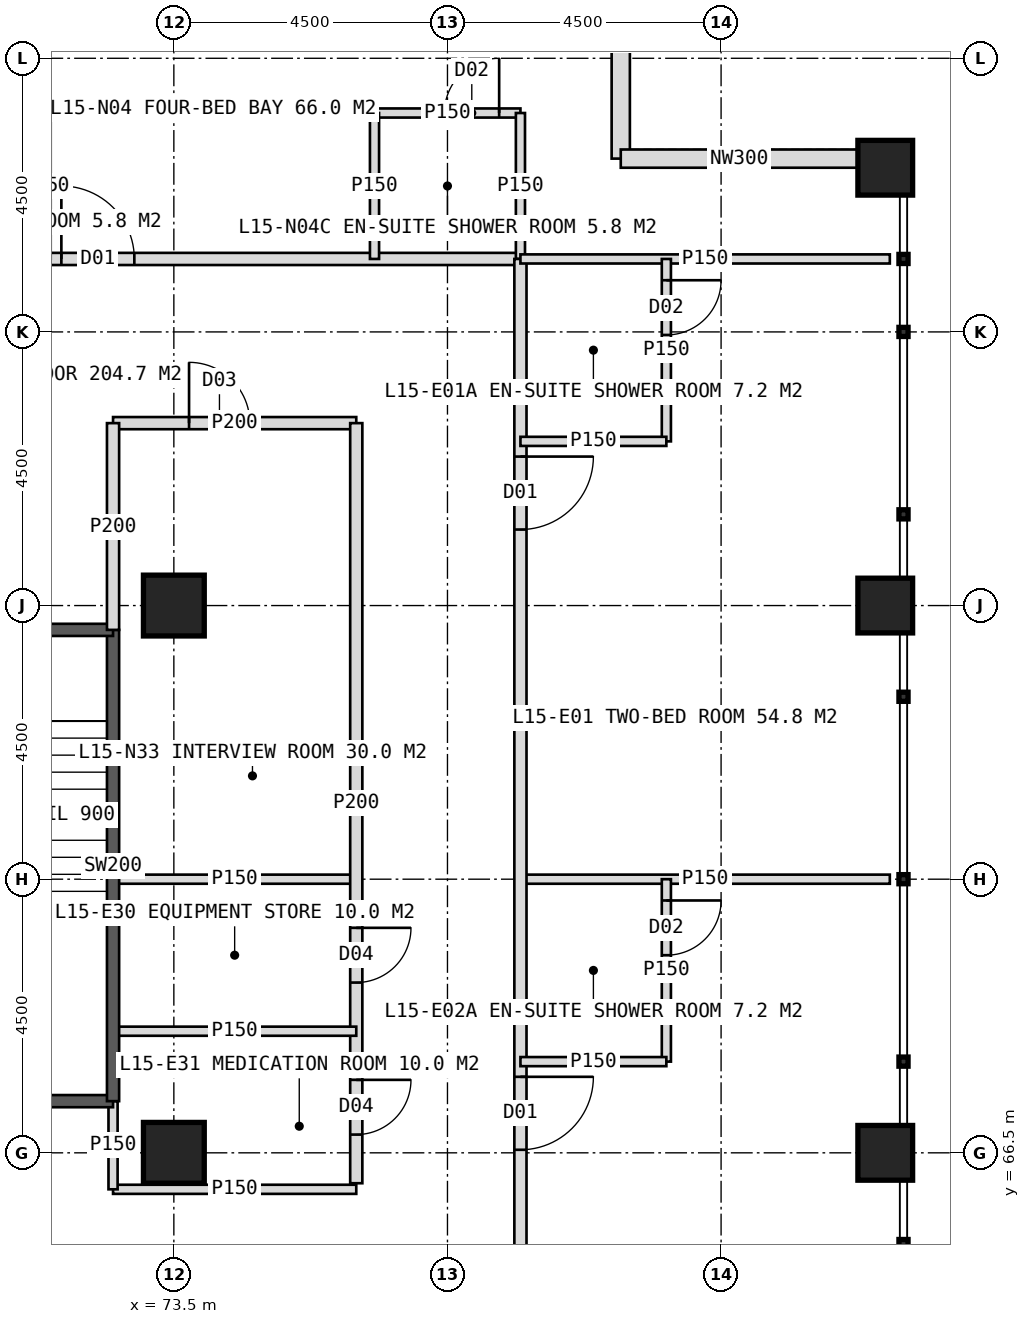
"""IFC4 building model, lengths in metres.
Left out: names, types, materials, properties, quantities, classifications, styles, units other than length and angle.
Written with IfcOpenShell. Run it as: python <this file> out.ifc"""

import sys

from ifc_helpers import new_model, si_unit, direction, frame, frame_2d, origin, origin_2d, place, context, subcontext, project, spatial, rectangle, hollow_rectangle, extrude, element, fill, save


model = new_model("IFC4")
c1 = context("Model", 3, precision=1e-05, world=origin(), true_north=direction((0.0, 1.0)))
c2 = subcontext(c1, "Body", "Model", "MODEL_VIEW")
j1 = project(units=[si_unit("LENGTHUNIT", "METRE"), si_unit("PLANEANGLEUNIT", "RADIAN")], contexts=[c1])
p1 = place(None, origin())
s1 = spatial("IfcSite", under=j1, at=p1, CompositionType="ELEMENT")
p2 = place(p1, origin())
s2 = spatial("IfcBuilding", under=s1, at=p2, CompositionType="ELEMENT")
p3 = place(p2, frame((0.0, 0.0, 67.0)))
s3 = spatial("IfcBuildingStorey", under=s2, at=p3, CompositionType="ELEMENT", Elevation=67.0)
for number, where, z_axis, x_axis in (
    (1, (73.5, 75.5, 0.0), (0.0, 0.0, 1.0), (1.0, 0.0, 0.0)),
    (2, (73.5, 66.5, 0.0), (0.0, 0.0, 1.0), (1.0, 0.0, 0.0)),
):
    element("IfcColumn", number, at=place(p3, frame(where, z_axis=z_axis, x_axis=x_axis)), inside=s3, PredefinedType="COLUMN", context=c2, shape_type="SweptSolid", body=[
        extrude(hollow_rectangle(XDim=1.0, YDim=1.0, WallThickness=0.1, at=origin_2d()), origin(), (0.0, 0.0, 1.0), 4.0),
    ])
for number, where, z_axis, x_axis in (
    (3, (85.2, 66.5, 0.0), (0.0, 0.0, 1.0), (1.0, 0.0, 0.0)),
    (4, (85.2, 75.5, 0.0), (0.0, 0.0, 1.0), (1.0, 0.0, 0.0)),
    (5, (85.2, 82.7, 0.0), (0.0, 0.0, 1.0), (1.0, 0.0, 0.0)),
):
    element("IfcColumn", number, at=place(p3, frame(where, z_axis=z_axis, x_axis=x_axis)), inside=s3, PredefinedType="COLUMN", context=c2, shape_type="SweptSolid", body=[
        extrude(hollow_rectangle(XDim=0.9, YDim=0.9, WallThickness=0.08, at=origin_2d()), origin(), (0.0, 0.0, 1.0), 4.0),
    ])
for number, where, z_axis, x_axis in (
    (6, (80.85, 86.75, 0.0), (0.0, 0.0, 1.0), (0.0, -1.0, 0.0)),
    (7, (80.85, 82.85, 0.0), (0.0, 0.0, 1.0), (1.0, 0.0, 0.0)),
):
    element("IfcWall", number, at=place(p3, frame(where, z_axis=z_axis, x_axis=x_axis)), inside=s3, PredefinedType="ELEMENTEDWALL", context=c2, shape_type="SweptSolid", body=[
        extrude(rectangle(XDim=3.9, YDim=0.3, at=frame_2d((1.95, 0.0))), origin(), (0.0, 0.0, 1.0), 2.95),
    ])
p4 = place(p3, frame((40.8, 81.2, 0.0), z_axis=(0.0, 0.0, 1.0), x_axis=(1.0, 0.0, 0.0)))
e8 = element("IfcWall", 8, at=p4, inside=s3, PredefinedType="PARTITIONING", context=c2, shape_type="SweptSolid", body=[
    extrude(rectangle(XDim=38.4, YDim=0.2, at=frame_2d((19.2, 0.0))), origin(), (0.0, 0.0, 1.0), 3.75),
])
p5 = place(p4, frame((4.5, 0.0, 0.0)))
e9 = element("IfcOpeningElement", 9, at=p5, cuts=e8, PredefinedType="OPENING", context=c2, shape_type="SweptSolid", body=[
    extrude(rectangle(XDim=1.2, YDim=2.2, at=frame_2d((0.6, 1.1))), frame((0.0, 0.11, 0.0), z_axis=(0.0, -1.0, 0.0), x_axis=(1.0, 0.0, 0.0)), (0.0, 0.0, 1.0), 0.22),
])
p6 = place(p4, frame((13.45, 0.0, 0.0)))
e10 = element("IfcOpeningElement", 10, at=p6, cuts=e8, PredefinedType="OPENING", context=c2, shape_type="SweptSolid", body=[
    extrude(rectangle(XDim=1.2, YDim=2.2, at=frame_2d((0.6, 1.1))), frame((0.0, 0.11, 0.0), z_axis=(0.0, -1.0, 0.0), x_axis=(1.0, 0.0, 0.0)), (0.0, 0.0, 1.0), 0.22),
])
p7 = place(p4, frame((22.45, 0.0, 0.0)))
e11 = element("IfcOpeningElement", 11, at=p7, cuts=e8, PredefinedType="OPENING", context=c2, shape_type="SweptSolid", body=[
    extrude(rectangle(XDim=1.2, YDim=2.2, at=frame_2d((0.6, 1.1))), frame((0.0, 0.11, 0.0), z_axis=(0.0, -1.0, 0.0), x_axis=(1.0, 0.0, 0.0)), (0.0, 0.0, 1.0), 0.22),
])
p8 = place(p4, frame((30.85, 0.0, 0.0)))
e12 = element("IfcOpeningElement", 12, at=p8, cuts=e8, PredefinedType="OPENING", context=c2, shape_type="SweptSolid", body=[
    extrude(rectangle(XDim=1.2, YDim=2.2, at=frame_2d((0.6, 1.1))), frame((0.0, 0.11, 0.0), z_axis=(0.0, -1.0, 0.0), x_axis=(1.0, 0.0, 0.0)), (0.0, 0.0, 1.0), 0.22),
])
p9 = place(p3, frame((76.8, 83.6, 0.0), z_axis=(0.0, 0.0, 1.0), x_axis=(1.0, 0.0, 0.0)))
e13 = element("IfcWall", 13, at=p9, inside=s3, PredefinedType="PARTITIONING", context=c2, shape_type="SweptSolid", body=[
    extrude(rectangle(XDim=2.4, YDim=0.15, at=frame_2d((1.2, 0.0))), origin(), (0.0, 0.0, 1.0), 3.75),
])
p10 = place(p9, frame((1.15, 0.0, 0.0)))
e14 = element("IfcOpeningElement", 14, at=p10, cuts=e13, PredefinedType="OPENING", context=c2, shape_type="SweptSolid", body=[
    extrude(rectangle(XDim=0.9, YDim=2.1, at=frame_2d((0.45, 1.05))), frame((0.0, 0.085, 0.0), z_axis=(0.0, -1.0, 0.0), x_axis=(1.0, 0.0, 0.0)), (0.0, 0.0, 1.0), 0.17),
])
for number, where, z_axis, x_axis in (
    (15, (76.8, 81.2, 0.0), (0.0, 0.0, 1.0), (0.0, 1.0, 0.0)),
    (16, (79.2, 81.2, 0.0), (0.0, 0.0, 1.0), (0.0, 1.0, 0.0)),
):
    element("IfcWall", number, at=place(p3, frame(where, z_axis=z_axis, x_axis=x_axis)), inside=s3, PredefinedType="PARTITIONING", context=c2, shape_type="SweptSolid", body=[
        extrude(rectangle(XDim=2.4, YDim=0.15, at=frame_2d((1.2, 0.0))), origin(), (0.0, 0.0, 1.0), 3.75),
    ])
p11 = place(p3, frame((72.5, 78.5, 0.0), z_axis=(0.0, 0.0, 1.0), x_axis=(1.0, 0.0, 0.0)))
e17 = element("IfcWall", 17, at=p11, inside=s3, PredefinedType="PARTITIONING", context=c2, shape_type="SweptSolid", body=[
    extrude(rectangle(XDim=4.0, YDim=0.2, at=frame_2d((2.0, 0.0))), origin(), (0.0, 0.0, 1.0), 3.75),
])
p12 = place(p11, frame((1.25, 0.0, 0.0)))
e18 = element("IfcOpeningElement", 18, at=p12, cuts=e17, PredefinedType="OPENING", context=c2, shape_type="SweptSolid", body=[
    extrude(rectangle(XDim=1.0, YDim=2.1, at=frame_2d((0.5, 1.05))), frame((0.0, 0.11, 0.0), z_axis=(0.0, -1.0, 0.0), x_axis=(1.0, 0.0, 0.0)), (0.0, 0.0, 1.0), 0.22),
])
p13 = place(p3, frame((79.2, 71.0, 0.0), z_axis=(0.0, 0.0, 1.0), x_axis=(1.0, 0.0, 0.0)))
e19 = element("IfcWall", 19, at=p13, inside=s3, PredefinedType="PARTITIONING", context=c2, shape_type="SweptSolid", body=[
    extrude(rectangle(XDim=6.075, YDim=0.15, at=frame_2d((3.038, 0.0))), origin(), (0.0, 0.0, 1.0), 3.75),
])
p14 = place(p3, frame((79.2, 81.2, 0.0), z_axis=(0.0, 0.0, 1.0), x_axis=(0.0, -1.0, 0.0)))
e20 = element("IfcWall", 20, at=p14, inside=s3, PredefinedType="PARTITIONING", context=c2, shape_type="SweptSolid", body=[
    extrude(rectangle(XDim=38.4, YDim=0.2, at=frame_2d((19.2, 0.0))), origin(), (0.0, 0.0, 1.0), 3.75),
])
p15 = place(p14, frame((3.25, 0.0, 0.0)))
e21 = element("IfcOpeningElement", 21, at=p15, cuts=e20, PredefinedType="OPENING", context=c2, shape_type="SweptSolid", body=[
    extrude(rectangle(XDim=1.2, YDim=2.2, at=frame_2d((0.6, 1.1))), frame((0.0, 0.11, 0.0), z_axis=(0.0, -1.0, 0.0), x_axis=(1.0, 0.0, 0.0)), (0.0, 0.0, 1.0), 0.22),
])
p16 = place(p14, frame((13.45, 0.0, 0.0)))
e22 = element("IfcOpeningElement", 22, at=p16, cuts=e20, PredefinedType="OPENING", context=c2, shape_type="SweptSolid", body=[
    extrude(rectangle(XDim=1.2, YDim=2.2, at=frame_2d((0.6, 1.1))), frame((0.0, 0.11, 0.0), z_axis=(0.0, -1.0, 0.0), x_axis=(1.0, 0.0, 0.0)), (0.0, 0.0, 1.0), 0.22),
])
p17 = place(p14, frame((21.85, 0.0, 0.0)))
e23 = element("IfcOpeningElement", 23, at=p17, cuts=e20, PredefinedType="OPENING", context=c2, shape_type="SweptSolid", body=[
    extrude(rectangle(XDim=1.2, YDim=2.2, at=frame_2d((0.6, 1.1))), frame((0.0, 0.11, 0.0), z_axis=(0.0, -1.0, 0.0), x_axis=(1.0, 0.0, 0.0)), (0.0, 0.0, 1.0), 0.22),
])
p18 = place(p14, frame((27.85, 0.0, 0.0)))
e24 = element("IfcOpeningElement", 24, at=p18, cuts=e20, PredefinedType="OPENING", context=c2, shape_type="SweptSolid", body=[
    extrude(rectangle(XDim=1.2, YDim=2.2, at=frame_2d((0.6, 1.1))), frame((0.0, 0.11, 0.0), z_axis=(0.0, -1.0, 0.0), x_axis=(1.0, 0.0, 0.0)), (0.0, 0.0, 1.0), 0.22),
])
p19 = place(p3, frame((79.2, 81.2, 0.0), z_axis=(0.0, 0.0, 1.0), x_axis=(1.0, 0.0, 0.0)))
e25 = element("IfcWall", 25, at=p19, inside=s3, PredefinedType="PARTITIONING", context=c2, shape_type="SweptSolid", body=[
    extrude(rectangle(XDim=6.075, YDim=0.15, at=frame_2d((3.038, 0.0))), origin(), (0.0, 0.0, 1.0), 3.75),
])
p20 = place(p3, frame((81.6, 81.2, 0.0), z_axis=(0.0, 0.0, 1.0), x_axis=(0.0, -1.0, 0.0)))
e26 = element("IfcWall", 26, at=p20, inside=s3, PredefinedType="PARTITIONING", context=c2, shape_type="SweptSolid", body=[
    extrude(rectangle(XDim=3.0, YDim=0.15, at=frame_2d((1.5, 0.0))), origin(), (0.0, 0.0, 1.0), 3.75),
])
p21 = place(p20, frame((0.35, 0.0, 0.0)))
e27 = element("IfcOpeningElement", 27, at=p21, cuts=e26, PredefinedType="OPENING", context=c2, shape_type="SweptSolid", body=[
    extrude(rectangle(XDim=0.9, YDim=2.1, at=frame_2d((0.45, 1.05))), frame((0.0, 0.085, 0.0), z_axis=(0.0, -1.0, 0.0), x_axis=(1.0, 0.0, 0.0)), (0.0, 0.0, 1.0), 0.17),
])
p22 = place(p3, frame((79.2, 78.2, 0.0), z_axis=(0.0, 0.0, 1.0), x_axis=(1.0, 0.0, 0.0)))
e28 = element("IfcWall", 28, at=p22, inside=s3, PredefinedType="PARTITIONING", context=c2, shape_type="SweptSolid", body=[
    extrude(rectangle(XDim=2.4, YDim=0.15, at=frame_2d((1.2, 0.0))), origin(), (0.0, 0.0, 1.0), 3.75),
])
p23 = place(p3, frame((81.6, 71.0, 0.0), z_axis=(0.0, 0.0, 1.0), x_axis=(0.0, -1.0, 0.0)))
e29 = element("IfcWall", 29, at=p23, inside=s3, PredefinedType="PARTITIONING", context=c2, shape_type="SweptSolid", body=[
    extrude(rectangle(XDim=3.0, YDim=0.15, at=frame_2d((1.5, 0.0))), origin(), (0.0, 0.0, 1.0), 3.75),
])
p24 = place(p23, frame((0.35, 0.0, 0.0)))
e30 = element("IfcOpeningElement", 30, at=p24, cuts=e29, PredefinedType="OPENING", context=c2, shape_type="SweptSolid", body=[
    extrude(rectangle(XDim=0.9, YDim=2.1, at=frame_2d((0.45, 1.05))), frame((0.0, 0.085, 0.0), z_axis=(0.0, -1.0, 0.0), x_axis=(1.0, 0.0, 0.0)), (0.0, 0.0, 1.0), 0.17),
])
p25 = place(p3, frame((79.2, 68.0, 0.0), z_axis=(0.0, 0.0, 1.0), x_axis=(1.0, 0.0, 0.0)))
e31 = element("IfcWall", 31, at=p25, inside=s3, PredefinedType="PARTITIONING", context=c2, shape_type="SweptSolid", body=[
    extrude(rectangle(XDim=2.4, YDim=0.15, at=frame_2d((1.2, 0.0))), origin(), (0.0, 0.0, 1.0), 3.75),
])
p26 = place(p3, frame((72.5, 71.0, 0.0), z_axis=(0.0, 0.0, 1.0), x_axis=(1.0, 0.0, 0.0)))
e32 = element("IfcWall", 32, at=p26, inside=s3, PredefinedType="PARTITIONING", context=c2, shape_type="SweptSolid", body=[
    extrude(rectangle(XDim=4.0, YDim=0.15, at=frame_2d((2.0, 0.0))), origin(), (0.0, 0.0, 1.0), 3.75),
])
p27 = place(p3, frame((76.5, 78.5, 0.0), z_axis=(0.0, 0.0, 1.0), x_axis=(0.0, -1.0, 0.0)))
e33 = element("IfcWall", 33, at=p27, inside=s3, PredefinedType="PARTITIONING", context=c2, shape_type="SweptSolid", body=[
    extrude(rectangle(XDim=12.5, YDim=0.2, at=frame_2d((6.25, 0.0))), origin(), (0.0, 0.0, 1.0), 3.75),
])
p28 = place(p27, frame((8.3, 0.0, 0.0)))
e34 = element("IfcOpeningElement", 34, at=p28, cuts=e33, PredefinedType="OPENING", context=c2, shape_type="SweptSolid", body=[
    extrude(rectangle(XDim=0.9, YDim=2.1, at=frame_2d((0.45, 1.05))), frame((0.0, 0.11, 0.0), z_axis=(0.0, -1.0, 0.0), x_axis=(1.0, 0.0, 0.0)), (0.0, 0.0, 1.0), 0.22),
])
p29 = place(p27, frame((10.8, 0.0, 0.0)))
e35 = element("IfcOpeningElement", 35, at=p29, cuts=e33, PredefinedType="OPENING", context=c2, shape_type="SweptSolid", body=[
    extrude(rectangle(XDim=0.9, YDim=2.1, at=frame_2d((0.45, 1.05))), frame((0.0, 0.11, 0.0), z_axis=(0.0, -1.0, 0.0), x_axis=(1.0, 0.0, 0.0)), (0.0, 0.0, 1.0), 0.22),
])
for number, where, z_axis, x_axis in (
    (36, (72.5, 65.9, 0.0), (0.0, 0.0, 1.0), (1.0, 0.0, 0.0)),
    (37, (72.5, 68.5, 0.0), (0.0, 0.0, 1.0), (1.0, 0.0, 0.0)),
):
    element("IfcWall", number, at=place(p3, frame(where, z_axis=z_axis, x_axis=x_axis)), inside=s3, PredefinedType="PARTITIONING", context=c2, shape_type="SweptSolid", body=[
        extrude(rectangle(XDim=4.0, YDim=0.15, at=frame_2d((2.0, 0.0))), origin(), (0.0, 0.0, 1.0), 3.75),
    ])
p30 = place(p3, frame((72.5, 65.9, 0.0), z_axis=(0.0, 0.0, 1.0), x_axis=(0.0, 1.0, 0.0)))
e38 = element("IfcWall", 38, at=p30, inside=s3, PredefinedType="PARTITIONING", context=c2, shape_type="SweptSolid", body=[
    extrude(rectangle(XDim=1.45, YDim=0.15, at=frame_2d((0.725, 0.0))), origin(), (0.0, 0.0, 1.0), 3.75),
])
p31 = place(p3, frame((69.0, 67.35, 0.0), z_axis=(0.0, 0.0, 1.0), x_axis=(1.0, 0.0, 0.0)))
e39 = element("IfcWall", 39, at=p31, inside=s3, PredefinedType="SOLIDWALL", context=c2, shape_type="SweptSolid", body=[
    extrude(rectangle(XDim=3.5, YDim=0.2, at=frame_2d((1.75, 0.0))), origin(), (0.0, 0.0, 1.0), 3.75),
])
p32 = place(p3, frame((72.5, 67.35, 0.0), z_axis=(0.0, 0.0, 1.0), x_axis=(0.0, 1.0, 0.0)))
e40 = element("IfcWall", 40, at=p32, inside=s3, PredefinedType="SOLIDWALL", context=c2, shape_type="SweptSolid", body=[
    extrude(rectangle(XDim=7.75, YDim=0.2, at=frame_2d((3.875, 0.0))), origin(), (0.0, 0.0, 1.0), 3.75),
])
p33 = place(p3, frame((69.0, 75.1, 0.0), z_axis=(0.0, 0.0, 1.0), x_axis=(1.0, 0.0, 0.0)))
e41 = element("IfcWall", 41, at=p33, inside=s3, PredefinedType="SOLIDWALL", context=c2, shape_type="SweptSolid", body=[
    extrude(rectangle(XDim=3.5, YDim=0.2, at=frame_2d((1.75, 0.0))), origin(), (0.0, 0.0, 1.0), 3.75),
])
p34 = place(p33, frame((1.15, 0.0, 0.0)))
e42 = element("IfcOpeningElement", 42, at=p34, cuts=e41, PredefinedType="OPENING", context=c2, shape_type="SweptSolid", body=[
    extrude(rectangle(XDim=1.2, YDim=2.1, at=frame_2d((0.6, 1.05))), frame((0.0, 0.11, 0.0), z_axis=(0.0, -1.0, 0.0), x_axis=(1.0, 0.0, 0.0)), (0.0, 0.0, 1.0), 0.22),
])
p35 = place(p3, frame((72.5, 75.1, 0.0), z_axis=(0.0, 0.0, 1.0), x_axis=(0.0, 1.0, 0.0)))
e43 = element("IfcWall", 43, at=p35, inside=s3, PredefinedType="PARTITIONING", context=c2, shape_type="SweptSolid", body=[
    extrude(rectangle(XDim=3.4, YDim=0.2, at=frame_2d((1.7, 0.0))), origin(), (0.0, 0.0, 1.0), 3.75),
])
p36 = place(p8, origin())
e44 = element("IfcDoor", 44, at=p36, inside=s3, OperationType="SINGLE_SWING_LEFT", PredefinedType="DOOR", context=c2, shape_type="SweptSolid", body=[
    extrude(rectangle(XDim=1.2, YDim=2.2, at=frame_2d((0.6, 1.1))), frame((0.0, 0.025, 0.0), z_axis=(0.0, -1.0, 0.0), x_axis=(1.0, 0.0, 0.0)), (0.0, 0.0, 1.0), 0.05),
])
fill(e12, e44)
p37 = place(p10, origin())
e45 = element("IfcDoor", 45, at=p37, inside=s3, OperationType="SINGLE_SWING_RIGHT", PredefinedType="DOOR", context=c2, shape_type="SweptSolid", body=[
    extrude(rectangle(XDim=0.9, YDim=2.1, at=frame_2d((0.45, 1.05))), frame((0.0, 0.025, 0.0), z_axis=(0.0, -1.0, 0.0), x_axis=(1.0, 0.0, 0.0)), (0.0, 0.0, 1.0), 0.05),
])
fill(e14, e45)
p38 = place(p12, origin())
e46 = element("IfcDoor", 46, at=p38, inside=s3, OperationType="SINGLE_SWING_LEFT", PredefinedType="DOOR", context=c2, shape_type="SweptSolid", body=[
    extrude(rectangle(XDim=1.0, YDim=2.1, at=frame_2d((0.5, 1.05))), frame((0.0, 0.025, 0.0), z_axis=(0.0, -1.0, 0.0), x_axis=(1.0, 0.0, 0.0)), (0.0, 0.0, 1.0), 0.05),
])
fill(e18, e46)
p39 = place(p15, origin())
e47 = element("IfcDoor", 47, at=p39, inside=s3, OperationType="SINGLE_SWING_LEFT", PredefinedType="DOOR", context=c2, shape_type="SweptSolid", body=[
    extrude(rectangle(XDim=1.2, YDim=2.2, at=frame_2d((0.6, 1.1))), frame((0.0, 0.025, 0.0), z_axis=(0.0, -1.0, 0.0), x_axis=(1.0, 0.0, 0.0)), (0.0, 0.0, 1.0), 0.05),
])
fill(e21, e47)
p40 = place(p21, origin())
e48 = element("IfcDoor", 48, at=p40, inside=s3, OperationType="SINGLE_SWING_LEFT", PredefinedType="DOOR", context=c2, shape_type="SweptSolid", body=[
    extrude(rectangle(XDim=0.9, YDim=2.1, at=frame_2d((0.45, 1.05))), frame((0.0, 0.025, 0.0), z_axis=(0.0, -1.0, 0.0), x_axis=(1.0, 0.0, 0.0)), (0.0, 0.0, 1.0), 0.05),
])
fill(e27, e48)
p41 = place(p16, origin())
e49 = element("IfcDoor", 49, at=p41, inside=s3, OperationType="SINGLE_SWING_LEFT", PredefinedType="DOOR", context=c2, shape_type="SweptSolid", body=[
    extrude(rectangle(XDim=1.2, YDim=2.2, at=frame_2d((0.6, 1.1))), frame((0.0, 0.025, 0.0), z_axis=(0.0, -1.0, 0.0), x_axis=(1.0, 0.0, 0.0)), (0.0, 0.0, 1.0), 0.05),
])
fill(e22, e49)
p42 = place(p24, origin())
e50 = element("IfcDoor", 50, at=p42, inside=s3, OperationType="SINGLE_SWING_LEFT", PredefinedType="DOOR", context=c2, shape_type="SweptSolid", body=[
    extrude(rectangle(XDim=0.9, YDim=2.1, at=frame_2d((0.45, 1.05))), frame((0.0, 0.025, 0.0), z_axis=(0.0, -1.0, 0.0), x_axis=(1.0, 0.0, 0.0)), (0.0, 0.0, 1.0), 0.05),
])
fill(e30, e50)
p43 = place(p28, origin())
e51 = element("IfcDoor", 51, at=p43, inside=s3, OperationType="SINGLE_SWING_LEFT", PredefinedType="DOOR", context=c2, shape_type="SweptSolid", body=[
    extrude(rectangle(XDim=0.9, YDim=2.1, at=frame_2d((0.45, 1.05))), frame((0.0, 0.025, 0.0), z_axis=(0.0, -1.0, 0.0), x_axis=(1.0, 0.0, 0.0)), (0.0, 0.0, 1.0), 0.05),
])
fill(e34, e51)
p44 = place(p29, origin())
e52 = element("IfcDoor", 52, at=p44, inside=s3, OperationType="SINGLE_SWING_LEFT", PredefinedType="DOOR", context=c2, shape_type="SweptSolid", body=[
    extrude(rectangle(XDim=0.9, YDim=2.1, at=frame_2d((0.45, 1.05))), frame((0.0, 0.025, 0.0), z_axis=(0.0, -1.0, 0.0), x_axis=(1.0, 0.0, 0.0)), (0.0, 0.0, 1.0), 0.05),
])
fill(e35, e52)
save(model, sys.argv[1])
